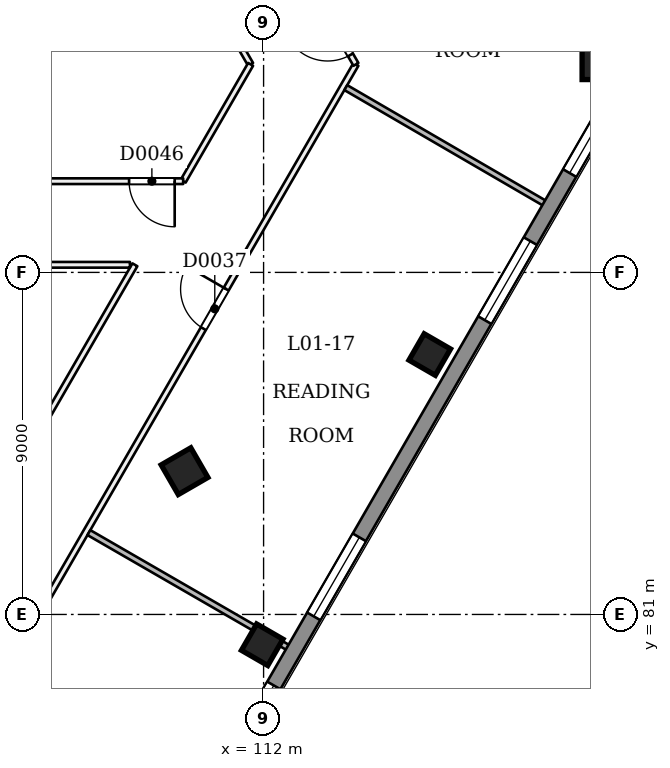
"""IFC4 building model, lengths in metres.
Left out: names, types, materials, properties, quantities, classifications, styles, units other than length and angle.
Written with IfcOpenShell. Run it as: python <this file> out.ifc"""

import sys

from ifc_helpers import new_model, si_unit, direction, frame, frame_2d, origin, origin_2d, place, context, subcontext, project, spatial, rectangle, extrude, element, fill, save


model = new_model("IFC4")
c1 = context("Model", 3, precision=1e-05, world=origin(), true_north=direction((0.0, 1.0)))
c2 = subcontext(c1, "Body", "Model", "MODEL_VIEW")
j1 = project(units=[si_unit("LENGTHUNIT", "METRE"), si_unit("PLANEANGLEUNIT", "RADIAN")], contexts=[c1])
p1 = place(None, origin())
s1 = spatial("IfcSite", under=j1, at=p1, CompositionType="ELEMENT")
p2 = place(p1, origin())
s2 = spatial("IfcBuilding", under=s1, at=p2, CompositionType="ELEMENT")
p3 = place(p2, frame((0.0, 0.0, 9.0)))
s3 = spatial("IfcBuildingStorey", under=s2, at=p3, CompositionType="ELEMENT", Elevation=9.0)
p4 = place(p3, frame((109.947, 84.723, -0.027), z_axis=(-0.022167823514, 0.038427840761, 0.999015459668), x_axis=(-0.500557781558, -0.865418902984, 0.022181742055)))
e1 = element("IfcColumn", 1, at=p4, inside=s3, PredefinedType="COLUMN", context=c2, shape_type="SweptSolid", body=[
    extrude(rectangle(XDim=0.9, YDim=0.9, at=origin_2d()), origin(), (0.0, 0.0, 1.0), 4.504),
])
for number, where, z_axis, x_axis in (
    (2, (111.964, 80.203, 0.0), (0.0, 0.0, 1.0), (0.5, 0.866, 0.0)),
    (3, (116.372, 87.838, 0.0), (0.0, 0.0, 1.0), (0.5, 0.866, 0.0)),
    (4, (120.781, 95.474, 0.0), (0.0, 0.0, 1.0), (1.745e-08, 1.0, 0.0)),
):
    element("IfcColumn", number, at=place(p3, frame(where, z_axis=z_axis, x_axis=x_axis)), inside=s3, PredefinedType="COLUMN", context=c2, shape_type="SweptSolid", body=[
        extrude(rectangle(XDim=0.8, YDim=0.8, at=origin_2d()), origin(), (0.0, 0.0, 1.0), 4.5),
    ])
p5 = place(p3, frame((86.747, 47.526, 0.0), z_axis=(0.0, 0.0, 1.0), x_axis=(0.500000085768, 0.866025354266, 0.0)))
e5 = element("IfcWall", 5, at=p5, inside=s3, PredefinedType="PARTITIONING", context=c2, shape_type="SweptSolid", body=[
    extrude(rectangle(XDim=55.365, YDim=0.15, at=frame_2d((27.682, 0.0))), origin(), (0.0, 0.0, 1.0), 4.05),
])
p6 = place(p5, frame((0.97, 0.0, 0.0)))
e6 = element("IfcOpeningElement", 6, at=p6, cuts=e5, PredefinedType="OPENING", context=c2, shape_type="SweptSolid", body=[
    extrude(rectangle(XDim=1.2, YDim=2.1, at=frame_2d((0.6, 1.05))), frame((0.0, 0.085, 0.0), z_axis=(0.0, -1.0, 0.0), x_axis=(1.0, 0.0, 0.0)), (0.0, 0.0, 1.0), 0.171),
])
p7 = place(p5, frame((9.082, 0.0, 0.0)))
e7 = element("IfcOpeningElement", 7, at=p7, cuts=e5, PredefinedType="OPENING", context=c2, shape_type="SweptSolid", body=[
    extrude(rectangle(XDim=1.2, YDim=2.1, at=frame_2d((0.6, 1.05))), frame((0.0, 0.085, 0.0), z_axis=(0.0, -1.0, 0.0), x_axis=(1.0, 0.0, 0.0)), (0.0, 0.0, 1.0), 0.171),
])
p8 = place(p5, frame((18.082, 0.0, 0.0)))
e8 = element("IfcOpeningElement", 8, at=p8, cuts=e5, PredefinedType="OPENING", context=c2, shape_type="SweptSolid", body=[
    extrude(rectangle(XDim=1.2, YDim=2.1, at=frame_2d((0.6, 1.05))), frame((0.0, 0.085, 0.0), z_axis=(0.0, -1.0, 0.0), x_axis=(1.0, 0.0, 0.0)), (0.0, 0.0, 1.0), 0.171),
])
p9 = place(p5, frame((23.613, 0.0, 0.0)))
e9 = element("IfcOpeningElement", 9, at=p9, cuts=e5, PredefinedType="OPENING", context=c2, shape_type="SweptSolid", body=[
    extrude(rectangle(XDim=1.0, YDim=2.1, at=frame_2d((0.5, 1.05))), frame((0.0, 0.085, 0.0), z_axis=(0.0, -1.0, 0.0), x_axis=(1.0, 0.0, 0.0)), (0.0, 0.0, 1.0), 0.171),
])
p10 = place(p5, frame((26.363, 0.0, 0.0)))
e10 = element("IfcOpeningElement", 10, at=p10, cuts=e5, PredefinedType="OPENING", context=c2, shape_type="SweptSolid", body=[
    extrude(rectangle(XDim=1.0, YDim=2.1, at=frame_2d((0.5, 1.05))), frame((0.0, 0.085, 0.0), z_axis=(0.0, -1.0, 0.0), x_axis=(1.0, 0.0, 0.0)), (0.0, 0.0, 1.0), 0.171),
])
p11 = place(p5, frame((33.032, 0.0, 0.0)))
e11 = element("IfcOpeningElement", 11, at=p11, cuts=e5, PredefinedType="OPENING", context=c2, shape_type="SweptSolid", body=[
    extrude(rectangle(XDim=1.2, YDim=2.1, at=frame_2d((0.6, 1.05))), frame((0.0, 0.085, 0.0), z_axis=(0.0, -1.0, 0.0), x_axis=(1.0, 0.0, 0.0)), (0.0, 0.0, 1.0), 0.171),
])
p12 = place(p5, frame((47.337, 0.0, 0.0)))
e12 = element("IfcOpeningElement", 12, at=p12, cuts=e5, PredefinedType="OPENING", context=c2, shape_type="SweptSolid", body=[
    extrude(rectangle(XDim=1.2, YDim=2.1, at=frame_2d((0.6, 1.05))), frame((0.0, 0.085, 0.0), z_axis=(0.0, -1.0, 0.0), x_axis=(1.0, 0.0, 0.0)), (0.0, 0.0, 1.0), 0.171),
])
p13 = place(p3, frame((114.43, 95.474, 0.0), z_axis=(0.0, 0.0, 1.0), x_axis=(-0.500008701212, 0.866020380079, 0.0)))
e13 = element("IfcWall", 13, at=p13, inside=s3, PredefinedType="PARTITIONING", context=c2, shape_type="SweptSolid", body=[
    extrude(rectangle(XDim=3.495, YDim=0.15, at=frame_2d((1.747, 0.0))), origin(), (0.0, 0.0, 1.0), 4.05),
])
p14 = place(p13, frame((0.288, 0.0, 0.0)))
e14 = element("IfcOpeningElement", 14, at=p14, cuts=e13, PredefinedType="OPENING", context=c2, shape_type="SweptSolid", body=[
    extrude(rectangle(XDim=1.2, YDim=2.1, at=frame_2d((0.6, 1.05))), frame((0.0, 0.085, 0.0), z_axis=(0.0, -1.0, 0.0), x_axis=(1.0, 0.0, 0.0)), (0.0, 0.0, 1.0), 0.171),
])
p15 = place(p3, frame((108.614, 90.2, 0.0), z_axis=(0.0, 0.0, 1.0), x_axis=(-0.500000743568, -0.866024974485, 0.0)))
e15 = element("IfcWall", 15, at=p15, inside=s3, PredefinedType="PARTITIONING", context=c2, shape_type="SweptSolid", body=[
    extrude(rectangle(XDim=31.87, YDim=0.15, at=frame_2d((15.935, 0.0))), origin(), (0.0, 0.0, 1.0), 4.05),
])
p16 = place(p15, frame((17.588, 0.0, 0.0)))
e16 = element("IfcOpeningElement", 16, at=p16, cuts=e15, PredefinedType="OPENING", context=c2, shape_type="SweptSolid", body=[
    extrude(rectangle(XDim=1.2, YDim=2.1, at=frame_2d((0.6, 1.05))), frame((0.0, 0.085, 0.0), z_axis=(0.0, -1.0, 0.0), x_axis=(1.0, 0.0, 0.0)), (0.0, 0.0, 1.0), 0.171),
])
p17 = place(p15, frame((27.503, 0.0, 0.0)))
e17 = element("IfcOpeningElement", 17, at=p17, cuts=e15, PredefinedType="OPENING", context=c2, shape_type="SweptSolid", body=[
    extrude(rectangle(XDim=1.0, YDim=2.1, at=frame_2d((0.5, 1.05))), frame((0.0, 0.085, 0.0), z_axis=(0.0, -1.0, 0.0), x_axis=(1.0, 0.0, 0.0)), (0.0, 0.0, 1.0), 0.171),
])
p18 = place(p15, frame((8.135, 0.0, 0.0)))
e18 = element("IfcOpeningElement", 18, at=p18, cuts=e15, PredefinedType="OPENING", context=c2, shape_type="SweptSolid", body=[
    extrude(rectangle(XDim=1.0, YDim=2.1, at=frame_2d((0.5, 1.05))), frame((0.0, 0.085, 0.0), z_axis=(0.0, -1.0, 0.0), x_axis=(1.0, 0.0, 0.0)), (0.0, 0.0, 1.0), 0.171),
])
p19 = place(p3, frame((91.6, 90.2, 0.0), z_axis=(0.0, 0.0, 1.0), x_axis=(1.0, 0.0, 0.0)))
e19 = element("IfcWall", 19, at=p19, inside=s3, PredefinedType="PARTITIONING", context=c2, shape_type="SweptSolid", body=[
    extrude(rectangle(XDim=16.884, YDim=0.15, at=frame_2d((8.442, 0.0))), origin(), (0.0, 0.0, 1.0), 4.05),
])
p20 = place(p3, frame((109.911, 98.5, 0.0), z_axis=(0.0, 0.0, 1.0), x_axis=(0.500008701212, -0.866020380079, 0.0)))
e20 = element("IfcWall", 20, at=p20, inside=s3, PredefinedType="PARTITIONING", context=c2, shape_type="SweptSolid", body=[
    extrude(rectangle(XDim=3.495, YDim=0.15, at=frame_2d((1.747, 0.0))), origin(), (0.0, 0.0, 1.0), 4.05),
])
p21 = place(p3, frame((111.658, 95.474, 0.0), z_axis=(0.0, 0.0, 1.0), x_axis=(-0.500008260065, -0.866020634781, 0.0)))
e21 = element("IfcWall", 21, at=p21, inside=s3, PredefinedType="PARTITIONING", context=c2, shape_type="SweptSolid", body=[
    extrude(rectangle(XDim=3.549, YDim=0.15, at=frame_2d((1.775, 0.0))), origin(), (0.0, 0.0, 1.0), 4.05),
])
p22 = place(p3, frame((109.884, 92.4, 0.0), z_axis=(0.0, 0.0, 1.0), x_axis=(-1.0, 0.0, 0.0)))
e22 = element("IfcWall", 22, at=p22, inside=s3, PredefinedType="PARTITIONING", context=c2, shape_type="SweptSolid", body=[
    extrude(rectangle(XDim=10.084, YDim=0.15, at=frame_2d((5.042, 0.0))), origin(), (0.0, 0.0, 1.0), 4.05),
])
p23 = place(p22, frame((0.223, 0.0, 0.0)))
e23 = element("IfcOpeningElement", 23, at=p23, cuts=e22, PredefinedType="OPENING", context=c2, shape_type="SweptSolid", body=[
    extrude(rectangle(XDim=1.2, YDim=2.1, at=frame_2d((0.6, 1.05))), frame((0.0, 0.085, 0.0), z_axis=(0.0, -1.0, 0.0), x_axis=(1.0, 0.0, 0.0)), (0.0, 0.0, 1.0), 0.171),
])
p24 = place(p22, frame((6.796, 0.0, 0.0)))
e24 = element("IfcOpeningElement", 24, at=p24, cuts=e22, PredefinedType="OPENING", context=c2, shape_type="SweptSolid", body=[
    extrude(rectangle(XDim=1.2, YDim=2.1, at=frame_2d((0.6, 1.05))), frame((0.0, 0.085, 0.0), z_axis=(0.0, -1.0, 0.0), x_axis=(1.0, 0.0, 0.0)), (0.0, 0.0, 1.0), 0.171),
])
p25 = place(p3, frame((112.881, 79.991, 0.0), z_axis=(0.0, 0.0, 1.0), x_axis=(-0.866042250622, 0.499970819286, 0.0)))
e25 = element("IfcWall", 25, at=p25, inside=s3, PredefinedType="PARTITIONING", context=c2, shape_type="SweptSolid", body=[
    extrude(rectangle(XDim=6.325, YDim=0.15, at=frame_2d((3.163, 0.0))), origin(), (0.0, 0.0, 1.0), 4.05),
])
p26 = place(p3, frame((119.631, 91.683, 0.0), z_axis=(0.0, 0.0, 1.0), x_axis=(-0.864489243455, 0.502651318462, 0.0)))
e26 = element("IfcWall", 26, at=p26, inside=s3, PredefinedType="PARTITIONING", context=c2, shape_type="SweptSolid", body=[
    extrude(rectangle(XDim=6.325, YDim=0.15, at=frame_2d((3.163, 0.0))), origin(), (0.0, 0.0, 1.0), 4.05),
])
p27 = place(p3, frame((121.762, 95.574, 0.0), z_axis=(0.0, 0.0, 1.0), x_axis=(-0.499997306052, -0.866026959131, 0.0)))
e27 = element("IfcWall", 27, at=p27, inside=s3, PredefinedType="SOLIDWALL", context=c2, shape_type="SweptSolid", body=[
    extrude(rectangle(XDim=62.87, YDim=0.4, at=frame_2d((31.435, 0.0))), origin(), (0.0, 0.0, 1.0), 4.05),
])
p28 = place(p27, frame((59.452, 0.0, 0.9)))
e28 = element("IfcOpeningElement", 28, at=p28, cuts=e27, PredefinedType="OPENING", context=c2, shape_type="SweptSolid", body=[
    extrude(rectangle(XDim=2.4, YDim=1.5, at=frame_2d((1.2, 0.75))), frame((0.0, 0.21, 0.0), z_axis=(0.0, -1.0, 0.0), x_axis=(1.0, 0.0, 0.0)), (0.0, 0.0, 1.0), 0.421),
])
p29 = place(p27, frame((54.986, 0.0, 0.9)))
e29 = element("IfcOpeningElement", 29, at=p29, cuts=e27, PredefinedType="OPENING", context=c2, shape_type="SweptSolid", body=[
    extrude(rectangle(XDim=2.4, YDim=1.5, at=frame_2d((1.2, 0.75))), frame((0.0, 0.21, 0.0), z_axis=(0.0, -1.0, 0.0), x_axis=(1.0, 0.0, 0.0)), (0.0, 0.0, 1.0), 0.421),
])
p30 = place(p27, frame((50.486, 0.0, 0.9)))
e30 = element("IfcOpeningElement", 30, at=p30, cuts=e27, PredefinedType="OPENING", context=c2, shape_type="SweptSolid", body=[
    extrude(rectangle(XDim=2.4, YDim=1.5, at=frame_2d((1.2, 0.75))), frame((0.0, 0.21, 0.0), z_axis=(0.0, -1.0, 0.0), x_axis=(1.0, 0.0, 0.0)), (0.0, 0.0, 1.0), 0.421),
])
p31 = place(p27, frame((45.986, 0.0, 0.9)))
e31 = element("IfcOpeningElement", 31, at=p31, cuts=e27, PredefinedType="OPENING", context=c2, shape_type="SweptSolid", body=[
    extrude(rectangle(XDim=2.4, YDim=1.5, at=frame_2d((1.2, 0.75))), frame((0.0, 0.21, 0.0), z_axis=(0.0, -1.0, 0.0), x_axis=(1.0, 0.0, 0.0)), (0.0, 0.0, 1.0), 0.421),
])
p32 = place(p27, frame((41.486, 0.0, 0.9)))
e32 = element("IfcOpeningElement", 32, at=p32, cuts=e27, PredefinedType="OPENING", context=c2, shape_type="SweptSolid", body=[
    extrude(rectangle(XDim=2.4, YDim=1.5, at=frame_2d((1.2, 0.75))), frame((0.0, 0.21, 0.0), z_axis=(0.0, -1.0, 0.0), x_axis=(1.0, 0.0, 0.0)), (0.0, 0.0, 1.0), 0.421),
])
p33 = place(p27, frame((36.986, 0.0, 0.9)))
e33 = element("IfcOpeningElement", 33, at=p33, cuts=e27, PredefinedType="OPENING", context=c2, shape_type="SweptSolid", body=[
    extrude(rectangle(XDim=2.4, YDim=1.5, at=frame_2d((1.2, 0.75))), frame((0.0, 0.21, 0.0), z_axis=(0.0, -1.0, 0.0), x_axis=(1.0, 0.0, 0.0)), (0.0, 0.0, 1.0), 0.421),
])
p34 = place(p27, frame((23.486, 0.0, 0.9)))
e34 = element("IfcOpeningElement", 34, at=p34, cuts=e27, PredefinedType="OPENING", context=c2, shape_type="SweptSolid", body=[
    extrude(rectangle(XDim=2.4, YDim=1.5, at=frame_2d((1.2, 0.75))), frame((0.0, 0.21, 0.0), z_axis=(0.0, -1.0, 0.0), x_axis=(1.0, 0.0, 0.0)), (0.0, 0.0, 1.0), 0.421),
])
p35 = place(p27, frame((18.986, 0.0, 0.9)))
e35 = element("IfcOpeningElement", 35, at=p35, cuts=e27, PredefinedType="OPENING", context=c2, shape_type="SweptSolid", body=[
    extrude(rectangle(XDim=2.4, YDim=1.5, at=frame_2d((1.2, 0.75))), frame((0.0, 0.21, 0.0), z_axis=(0.0, -1.0, 0.0), x_axis=(1.0, 0.0, 0.0)), (0.0, 0.0, 1.0), 0.421),
])
p36 = place(p27, frame((14.486, 0.0, 0.9)))
e36 = element("IfcOpeningElement", 36, at=p36, cuts=e27, PredefinedType="OPENING", context=c2, shape_type="SweptSolid", body=[
    extrude(rectangle(XDim=2.4, YDim=1.5, at=frame_2d((1.2, 0.75))), frame((0.0, 0.21, 0.0), z_axis=(0.0, -1.0, 0.0), x_axis=(1.0, 0.0, 0.0)), (0.0, 0.0, 1.0), 0.421),
])
p37 = place(p27, frame((5.486, 0.0, 0.9)))
e37 = element("IfcOpeningElement", 37, at=p37, cuts=e27, PredefinedType="OPENING", context=c2, shape_type="SweptSolid", body=[
    extrude(rectangle(XDim=2.4, YDim=1.5, at=frame_2d((1.2, 0.75))), frame((0.0, 0.21, 0.0), z_axis=(0.0, -1.0, 0.0), x_axis=(1.0, 0.0, 0.0)), (0.0, 0.0, 1.0), 0.421),
])
p38 = place(p27, frame((1.018, 0.0, 0.9)))
e38 = element("IfcOpeningElement", 38, at=p38, cuts=e27, PredefinedType="OPENING", context=c2, shape_type="SweptSolid", body=[
    extrude(rectangle(XDim=2.4, YDim=1.5, at=frame_2d((1.2, 0.75))), frame((0.0, 0.21, 0.0), z_axis=(0.0, -1.0, 0.0), x_axis=(1.0, 0.0, 0.0)), (0.0, 0.0, 1.0), 0.421),
])
p39 = place(p3, frame((116.262, 104.9, 0.0), z_axis=(0.0, 0.0, 1.0), x_axis=(0.50000615651, -0.866021849293, 0.0)))
e39 = element("IfcWall", 39, at=p39, inside=s3, PredefinedType="SOLIDWALL", context=c2, shape_type="SweptSolid", body=[
    extrude(rectangle(XDim=11.0, YDim=0.4, at=frame_2d((5.5, 0.0))), origin(), (0.0, 0.0, 1.0), 4.05),
])
p40 = place(p39, frame((4.3, 0.0, 0.9)))
e40 = element("IfcOpeningElement", 40, at=p40, cuts=e39, PredefinedType="OPENING", context=c2, shape_type="SweptSolid", body=[
    extrude(rectangle(XDim=2.4, YDim=1.5, at=frame_2d((1.2, 0.75))), frame((0.0, 0.21, 0.0), z_axis=(0.0, -1.0, 0.0), x_axis=(1.0, 0.0, 0.0)), (0.0, 0.0, 1.0), 0.421),
])
p41 = place(p12, origin())
e41 = element("IfcDoor", 41, at=p41, inside=s3, OperationType="SINGLE_SWING_RIGHT", PredefinedType="NOTDEFINED", context=c2, shape_type="SweptSolid", body=[
    extrude(rectangle(XDim=1.2, YDim=2.1, at=frame_2d((0.6, 1.05))), frame((0.0, 0.025, 0.0), z_axis=(0.0, -1.0, 0.0), x_axis=(1.0, 0.0, 0.0)), (0.0, 0.0, 1.0), 0.05),
])
fill(e12, e41)
p42 = place(p14, origin())
e42 = element("IfcDoor", 42, at=p42, inside=s3, OperationType="SINGLE_SWING_RIGHT", PredefinedType="NOTDEFINED", context=c2, shape_type="SweptSolid", body=[
    extrude(rectangle(XDim=1.2, YDim=2.1, at=frame_2d((0.6, 1.05))), frame((0.0, 0.025, 0.0), z_axis=(0.0, -1.0, 0.0), x_axis=(1.0, 0.0, 0.0)), (0.0, 0.0, 1.0), 0.05),
])
fill(e14, e42)
p43 = place(p23, origin())
e43 = element("IfcDoor", 43, at=p43, inside=s3, OperationType="SINGLE_SWING_LEFT", PredefinedType="NOTDEFINED", context=c2, shape_type="SweptSolid", body=[
    extrude(rectangle(XDim=1.2, YDim=2.1, at=frame_2d((0.6, 1.05))), frame((0.0, 0.025, 0.0), z_axis=(0.0, -1.0, 0.0), x_axis=(1.0, 0.0, 0.0)), (0.0, 0.0, 1.0), 0.05),
])
fill(e23, e43)
p44 = place(p35, origin())
e44 = element("IfcWindow", 44, at=p44, inside=s3, PartitioningType="SINGLE_PANEL", PredefinedType="WINDOW", context=c2, shape_type="SweptSolid", body=[
    extrude(rectangle(XDim=2.4, YDim=1.5, at=frame_2d((1.2, 0.75))), frame((0.0, 0.03, 0.0), z_axis=(0.0, -1.0, 0.0), x_axis=(1.0, 0.0, 0.0)), (0.0, 0.0, 1.0), 0.06),
])
fill(e35, e44)
p45 = place(p36, origin())
e45 = element("IfcWindow", 45, at=p45, inside=s3, PartitioningType="SINGLE_PANEL", PredefinedType="WINDOW", context=c2, shape_type="SweptSolid", body=[
    extrude(rectangle(XDim=2.4, YDim=1.5, at=frame_2d((1.2, 0.75))), frame((0.0, 0.03, 0.0), z_axis=(0.0, -1.0, 0.0), x_axis=(1.0, 0.0, 0.0)), (0.0, 0.0, 1.0), 0.06),
])
fill(e36, e45)
p46 = place(p37, origin())
e46 = element("IfcWindow", 46, at=p46, inside=s3, PartitioningType="SINGLE_PANEL", PredefinedType="WINDOW", context=c2, shape_type="SweptSolid", body=[
    extrude(rectangle(XDim=2.4, YDim=1.5, at=frame_2d((1.2, 0.75))), frame((0.0, 0.03, 0.0), z_axis=(0.0, -1.0, 0.0), x_axis=(1.0, 0.0, 0.0)), (0.0, 0.0, 1.0), 0.06),
])
fill(e37, e46)
p47 = place(p38, origin())
e47 = element("IfcWindow", 47, at=p47, inside=s3, PartitioningType="SINGLE_PANEL", PredefinedType="WINDOW", context=c2, shape_type="SweptSolid", body=[
    extrude(rectangle(XDim=2.4, YDim=1.5, at=frame_2d((1.2, 0.75))), frame((0.0, 0.03, 0.0), z_axis=(0.0, -1.0, 0.0), x_axis=(1.0, 0.0, 0.0)), (0.0, 0.0, 1.0), 0.06),
])
fill(e38, e47)
save(model, sys.argv[1])
